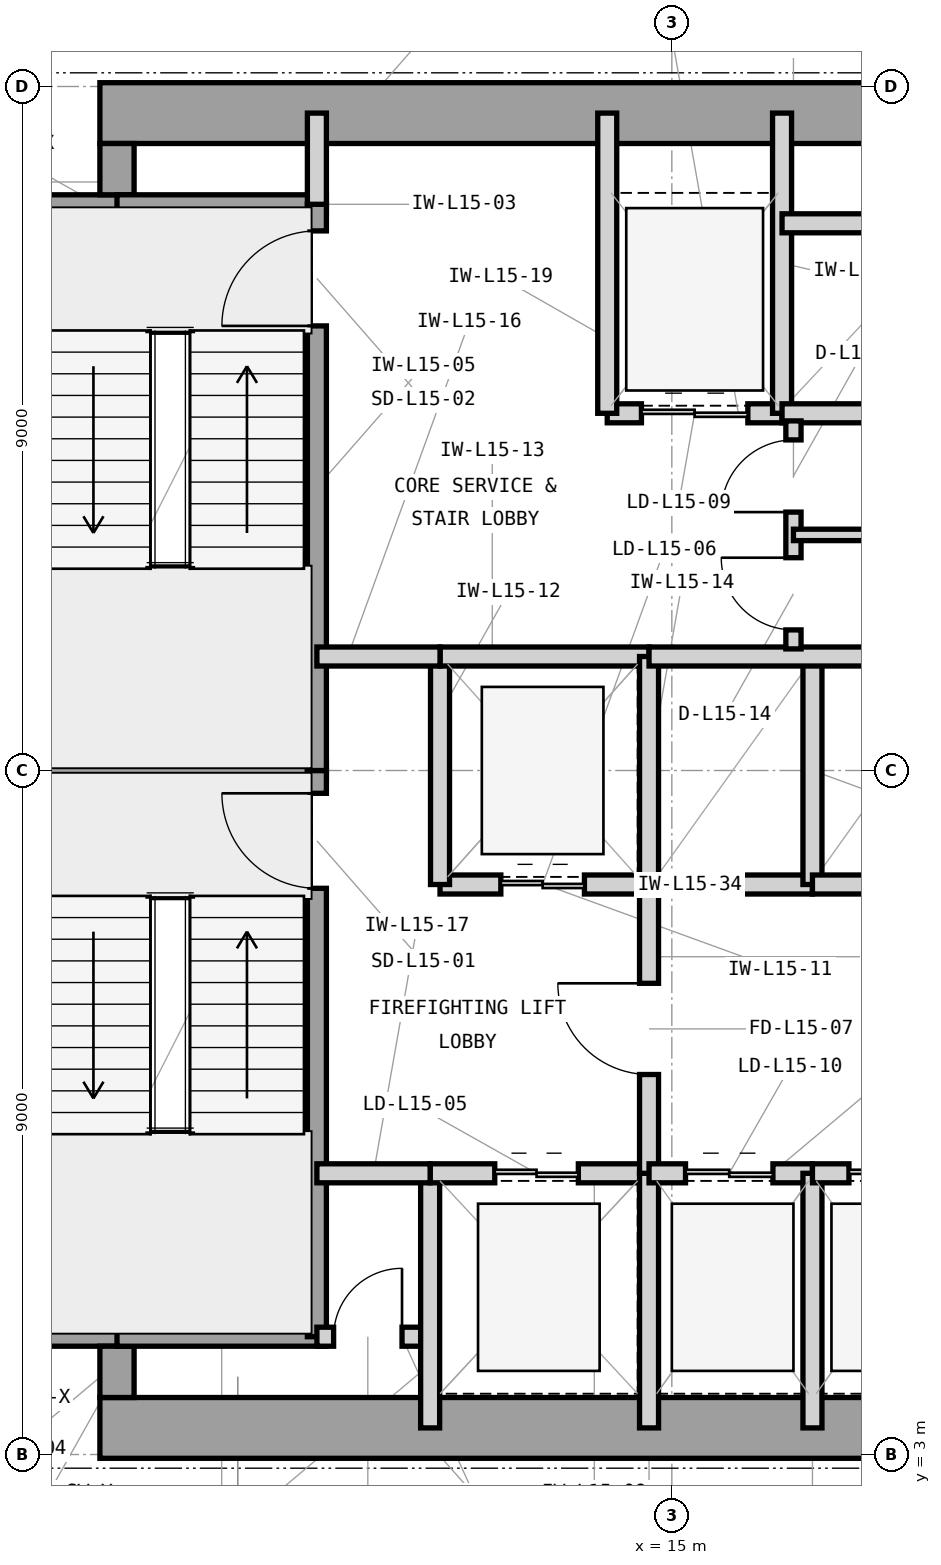
"""IFC4 building model, lengths in metres.
Left out: names, types, materials, properties, quantities, classifications, styles, units other than length and angle.
Written with IfcOpenShell. Run it as: python <this file> out.ifc"""

import sys

from ifc_helpers import new_model, si_unit, direction, frame, frame_2d, origin, place, context, subcontext, project, spatial, rectangle, extrude, element, fill, save


model = new_model("IFC4")
c1 = context("Model", 3, precision=1e-05, world=origin(), true_north=direction((0.0, 1.0)))
c2 = subcontext(c1, "Body", "Model", "MODEL_VIEW")
j1 = project(units=[si_unit("LENGTHUNIT", "METRE"), si_unit("PLANEANGLEUNIT", "RADIAN")], contexts=[c1])
p1 = place(None, origin())
s1 = spatial("IfcSite", under=j1, at=p1, CompositionType="ELEMENT")
p2 = place(p1, origin())
s2 = spatial("IfcBuilding", under=s1, at=p2, CompositionType="ELEMENT")
p3 = place(p2, frame((0.0, 0.0, 67.8)))
s3 = spatial("IfcBuildingStorey", under=s2, at=p3, CompositionType="ELEMENT", Elevation=67.8)
p4 = place(p3, frame((7.475, 3.35, 0.0), z_axis=(0.0, 0.0, 1.0), x_axis=(1.0, 0.0, 0.0)))
e1 = element("IfcWall", 1, at=p4, inside=s3, PredefinedType="SHEAR", context=c2, shape_type="SweptSolid", body=[
    extrude(rectangle(XDim=16.575, YDim=0.8, at=frame_2d((8.288, 0.0))), origin(), (0.0, 0.0, 1.0), 4.2),
])
p5 = place(p3, frame((7.475, 20.65, 0.0), z_axis=(0.0, 0.0, 1.0), x_axis=(1.0, 0.0, 0.0)))
e2 = element("IfcWall", 2, at=p5, inside=s3, PredefinedType="SHEAR", context=c2, shape_type="SweptSolid", body=[
    extrude(rectangle(XDim=12.325, YDim=0.8, at=frame_2d((6.163, 0.0))), origin(), (0.0, 0.0, 1.0), 4.2),
])
p6 = place(p3, frame((6.75, 4.65, 0.0), z_axis=(0.0, 0.0, 1.0), x_axis=(1.0, 0.0, 0.0)))
e3 = element("IfcWall", 3, at=p6, inside=s3, PredefinedType="SHEAR", context=c2, shape_type="SweptSolid", body=[
    extrude(rectangle(XDim=1.175, YDim=0.45, at=frame_2d((0.587, 0.0))), origin(), (0.0, 0.0, 1.0), 4.2),
])
p7 = place(p3, frame((7.7, 3.75, 0.0), z_axis=(0.0, 0.0, 1.0), x_axis=(0.0, 1.0, 0.0)))
e4 = element("IfcWall", 4, at=p7, inside=s3, PredefinedType="SHEAR", context=c2, shape_type="SweptSolid", body=[
    extrude(rectangle(XDim=0.675, YDim=0.45, at=frame_2d((0.337, 0.0))), origin(), (0.0, 0.0, 1.0), 4.2),
])
p8 = place(p3, frame((6.75, 19.35, 0.0), z_axis=(0.0, 0.0, 1.0), x_axis=(1.0, 0.0, 0.0)))
e5 = element("IfcWall", 5, at=p8, inside=s3, PredefinedType="SHEAR", context=c2, shape_type="SweptSolid", body=[
    extrude(rectangle(XDim=1.175, YDim=0.45, at=frame_2d((0.587, 0.0))), origin(), (0.0, 0.0, 1.0), 4.2),
])
p9 = place(p3, frame((7.7, 19.575, 0.0), z_axis=(0.0, 0.0, 1.0), x_axis=(0.0, 1.0, 0.0)))
e6 = element("IfcWall", 6, at=p9, inside=s3, PredefinedType="SHEAR", context=c2, shape_type="SweptSolid", body=[
    extrude(rectangle(XDim=0.675, YDim=0.45, at=frame_2d((0.337, 0.0))), origin(), (0.0, 0.0, 1.0), 4.2),
])
p10 = place(p3, frame((6.35, 12.0, 0.0), z_axis=(0.0, 0.0, 1.0), x_axis=(1.0, 0.0, 0.0)))
e7 = element("IfcWall", 7, at=p10, inside=s3, PredefinedType="SHEAR", context=c2, shape_type="SweptSolid", body=[
    extrude(rectangle(XDim=4.105, YDim=0.25, at=frame_2d((2.052, 0.0))), origin(), (0.0, 0.0, 1.0), 4.2),
])
for number, where, z_axis, x_axis in (
    (8, (7.7, 4.55, 0.0), (0.0, 0.0, 1.0), (1.0, 0.0, 0.0)),
    (9, (7.7, 19.45, 0.0), (0.0, 0.0, 1.0), (1.0, 0.0, 0.0)),
):
    element("IfcWall", number, at=place(p3, frame(where, z_axis=z_axis, x_axis=x_axis)), inside=s3, PredefinedType="SHEAR", context=c2, shape_type="SweptSolid", body=[
        extrude(rectangle(XDim=2.755, YDim=0.25, at=frame_2d((1.377, 0.0))), origin(), (0.0, 0.0, 1.0), 4.2),
    ])
p11 = place(p3, frame((10.33, 4.55, 0.0), z_axis=(0.0, 0.0, 1.0), x_axis=(0.0, 1.0, 0.0)))
e10 = element("IfcWall", 10, at=p11, inside=s3, PredefinedType="SHEAR", context=c2, shape_type="SweptSolid", body=[
    extrude(rectangle(XDim=7.45, YDim=0.25, at=frame_2d((3.725, 0.0))), origin(), (0.0, 0.0, 1.0), 4.2),
])
p12 = place(p11, frame((5.9, 0.0, 0.0)))
e11 = element("IfcOpeningElement", 11, at=p12, cuts=e10, PredefinedType="OPENING", context=c2, shape_type="SweptSolid", body=[
    extrude(rectangle(XDim=1.25, YDim=2.2, at=frame_2d((0.625, 1.1))), frame((0.0, 0.135, 0.0), z_axis=(0.0, -1.0, 0.0), x_axis=(1.0, 0.0, 0.0)), (0.0, 0.0, 1.0), 0.27),
])
p13 = place(p3, frame((10.33, 12.0, 0.0), z_axis=(0.0, 0.0, 1.0), x_axis=(0.0, 1.0, 0.0)))
e12 = element("IfcWall", 12, at=p13, inside=s3, PredefinedType="SHEAR", context=c2, shape_type="SweptSolid", body=[
    extrude(rectangle(XDim=7.45, YDim=0.25, at=frame_2d((3.725, 0.0))), origin(), (0.0, 0.0, 1.0), 4.2),
])
p14 = place(p13, frame((5.85, 0.0, 0.0)))
e13 = element("IfcOpeningElement", 13, at=p14, cuts=e12, PredefinedType="OPENING", context=c2, shape_type="SweptSolid", body=[
    extrude(rectangle(XDim=1.25, YDim=2.2, at=frame_2d((0.625, 1.1))), frame((0.0, 0.135, 0.0), z_axis=(0.0, -1.0, 0.0), x_axis=(1.0, 0.0, 0.0)), (0.0, 0.0, 1.0), 0.27),
])
p15 = place(p3, frame((10.33, 4.55, 0.0), z_axis=(0.0, 0.0, 1.0), x_axis=(1.0, 0.0, 0.0)))
e14 = element("IfcWall", 14, at=p15, inside=s3, PredefinedType="PARTITIONING", context=c2, shape_type="SweptSolid", body=[
    extrude(rectangle(XDim=1.49, YDim=0.25, at=frame_2d((0.745, 0.0))), origin(), (0.0, 0.0, 1.0), 3.97),
])
p16 = place(p15, frame((0.22, 0.0, 0.0)))
e15 = element("IfcOpeningElement", 15, at=p16, cuts=e14, PredefinedType="OPENING", context=c2, shape_type="SweptSolid", body=[
    extrude(rectangle(XDim=0.9, YDim=2.1, at=frame_2d((0.45, 1.05))), frame((0.0, 0.135, 0.0), z_axis=(0.0, -1.0, 0.0), x_axis=(1.0, 0.0, 0.0)), (0.0, 0.0, 1.0), 0.27),
])
p17 = place(p3, frame((11.82, 3.35, 0.0), z_axis=(0.0, 0.0, 1.0), x_axis=(0.0, 1.0, 0.0)))
e16 = element("IfcWall", 16, at=p17, inside=s3, PredefinedType="PARTITIONING", context=c2, shape_type="SweptSolid", body=[
    extrude(rectangle(XDim=3.35, YDim=0.25, at=frame_2d((1.675, 0.0))), origin(), (0.0, 0.0, 1.0), 3.97),
])
p18 = place(p3, frame((10.33, 19.45, 0.0), z_axis=(0.0, 0.0, 1.0), x_axis=(0.0, 1.0, 0.0)))
e17 = element("IfcWall", 17, at=p18, inside=s3, PredefinedType="PARTITIONING", context=c2, shape_type="SweptSolid", body=[
    extrude(rectangle(XDim=1.2, YDim=0.25, at=frame_2d((0.6, 0.0))), origin(), (0.0, 0.0, 1.0), 3.114),
])
p19 = place(p3, frame((11.82, 6.7, 0.0), z_axis=(0.0, 0.0, 1.0), x_axis=(1.0, 0.0, 0.0)))
e18 = element("IfcWall", 18, at=p19, inside=s3, PredefinedType="PARTITIONING", context=c2, shape_type="SweptSolid", body=[
    extrude(rectangle(XDim=2.88, YDim=0.25, at=frame_2d((1.44, 0.0))), origin(), (0.0, 0.0, 1.0), 3.426),
])
p20 = place(p19, frame((0.85, 0.0, 0.0)))
e19 = element("IfcOpeningElement", 19, at=p20, cuts=e18, PredefinedType="OPENING", context=c2, shape_type="SweptSolid", body=[
    extrude(rectangle(XDim=1.1, YDim=2.25, at=frame_2d((0.55, 1.125))), frame((0.0, 0.135, 0.0), z_axis=(0.0, -1.0, 0.0), x_axis=(1.0, 0.0, 0.0)), (0.0, 0.0, 1.0), 0.27),
])
p21 = place(p3, frame((14.7, 3.35, 0.0), z_axis=(0.0, 0.0, 1.0), x_axis=(0.0, 1.0, 0.0)))
e20 = element("IfcWall", 20, at=p21, inside=s3, PredefinedType="PARTITIONING", context=c2, shape_type="SweptSolid", body=[
    extrude(rectangle(XDim=3.35, YDim=0.25, at=frame_2d((1.675, 0.0))), origin(), (0.0, 0.0, 1.0), 3.97),
])
p22 = place(p3, frame((11.95, 10.5, 0.0), z_axis=(0.0, 0.0, 1.0), x_axis=(1.0, 0.0, 0.0)))
e21 = element("IfcWall", 21, at=p22, inside=s3, PredefinedType="PARTITIONING", context=c2, shape_type="SweptSolid", body=[
    extrude(rectangle(XDim=2.75, YDim=0.25, at=frame_2d((1.375, 0.0))), origin(), (0.0, 0.0, 1.0), 3.426),
])
p23 = place(p22, frame((0.8, 0.0, 0.0)))
e22 = element("IfcOpeningElement", 22, at=p23, cuts=e21, PredefinedType="OPENING", context=c2, shape_type="SweptSolid", body=[
    extrude(rectangle(XDim=1.1, YDim=2.25, at=frame_2d((0.55, 1.125))), frame((0.0, 0.135, 0.0), z_axis=(0.0, -1.0, 0.0), x_axis=(1.0, 0.0, 0.0)), (0.0, 0.0, 1.0), 0.27),
])
p24 = place(p3, frame((11.95, 10.5, 0.0), z_axis=(0.0, 0.0, 1.0), x_axis=(0.0, 1.0, 0.0)))
e23 = element("IfcWall", 23, at=p24, inside=s3, PredefinedType="PARTITIONING", context=c2, shape_type="SweptSolid", body=[
    extrude(rectangle(XDim=3.0, YDim=0.25, at=frame_2d((1.5, 0.0))), origin(), (0.0, 0.0, 1.0), 3.97),
])
p25 = place(p3, frame((11.95, 13.5, 0.0), z_axis=(0.0, 0.0, 1.0), x_axis=(1.0, 0.0, 0.0)))
e24 = element("IfcWall", 24, at=p25, inside=s3, PredefinedType="PARTITIONING", context=c2, shape_type="SweptSolid", body=[
    extrude(rectangle(XDim=2.75, YDim=0.25, at=frame_2d((1.375, 0.0))), origin(), (0.0, 0.0, 1.0), 3.426),
])
p26 = place(p3, frame((14.7, 10.5, 0.0), z_axis=(0.0, 0.0, 1.0), x_axis=(0.0, 1.0, 0.0)))
e25 = element("IfcWall", 25, at=p26, inside=s3, PredefinedType="PARTITIONING", context=c2, shape_type="SweptSolid", body=[
    extrude(rectangle(XDim=3.0, YDim=0.25, at=frame_2d((1.5, 0.0))), origin(), (0.0, 0.0, 1.0), 3.97),
])
p27 = place(p3, frame((14.7, 6.7, 0.0), z_axis=(0.0, 0.0, 1.0), x_axis=(0.0, 1.0, 0.0)))
e26 = element("IfcWall", 26, at=p27, inside=s3, PredefinedType="PARTITIONING", context=c2, shape_type="SweptSolid", body=[
    extrude(rectangle(XDim=3.8, YDim=0.25, at=frame_2d((1.9, 0.0))), origin(), (0.0, 0.0, 1.0), 3.97),
])
p28 = place(p27, frame((1.3, 0.0, 0.0)))
e27 = element("IfcOpeningElement", 27, at=p28, cuts=e26, PredefinedType="OPENING", context=c2, shape_type="SweptSolid", body=[
    extrude(rectangle(XDim=1.2, YDim=2.2, at=frame_2d((0.6, 1.1))), frame((0.0, 0.135, 0.0), z_axis=(0.0, -1.0, 0.0), x_axis=(1.0, 0.0, 0.0)), (0.0, 0.0, 1.0), 0.27),
])
p29 = place(p3, frame((10.33, 13.5, 0.0), z_axis=(0.0, 0.0, 1.0), x_axis=(1.0, 0.0, 0.0)))
e28 = element("IfcWall", 28, at=p29, inside=s3, PredefinedType="PARTITIONING", context=c2, shape_type="SweptSolid", body=[
    extrude(rectangle(XDim=1.62, YDim=0.25, at=frame_2d((0.81, 0.0))), origin(), (0.0, 0.0, 1.0), 3.426),
])
p30 = place(p3, frame((10.33, 6.7, 0.0), z_axis=(0.0, 0.0, 1.0), x_axis=(1.0, 0.0, 0.0)))
e29 = element("IfcWall", 29, at=p30, inside=s3, PredefinedType="PARTITIONING", context=c2, shape_type="SweptSolid", body=[
    extrude(rectangle(XDim=1.49, YDim=0.25, at=frame_2d((0.745, 0.0))), origin(), (0.0, 0.0, 1.0), 3.426),
])
p31 = place(p3, frame((14.15, 16.7, 0.0), z_axis=(0.0, 0.0, 1.0), x_axis=(1.0, 0.0, 0.0)))
e30 = element("IfcWall", 30, at=p31, inside=s3, PredefinedType="PARTITIONING", context=c2, shape_type="SweptSolid", body=[
    extrude(rectangle(XDim=2.3, YDim=0.25, at=frame_2d((1.15, 0.0))), origin(), (0.0, 0.0, 1.0), 3.426),
])
p32 = place(p31, frame((0.45, 0.0, 0.0)))
e31 = element("IfcOpeningElement", 31, at=p32, cuts=e30, PredefinedType="OPENING", context=c2, shape_type="SweptSolid", body=[
    extrude(rectangle(XDim=1.4, YDim=2.35, at=frame_2d((0.7, 1.175))), frame((0.0, 0.135, 0.0), z_axis=(0.0, -1.0, 0.0), x_axis=(1.0, 0.0, 0.0)), (0.0, 0.0, 1.0), 0.27),
])
for number, where, z_axis, x_axis in (
    (32, (14.15, 16.7, 0.0), (0.0, 0.0, 1.0), (0.0, 1.0, 0.0)),
    (33, (16.45, 16.7, 0.0), (0.0, 0.0, 1.0), (0.0, 1.0, 0.0)),
):
    element("IfcWall", number, at=place(p3, frame(where, z_axis=z_axis, x_axis=x_axis)), inside=s3, PredefinedType="PARTITIONING", context=c2, shape_type="SweptSolid", body=[
        extrude(rectangle(XDim=3.95, YDim=0.25, at=frame_2d((1.975, 0.0))), origin(), (0.0, 0.0, 1.0), 3.97),
    ])
p33 = place(p3, frame((16.45, 16.7, 0.0), z_axis=(0.0, 0.0, 1.0), x_axis=(1.0, 0.0, 0.0)))
e34 = element("IfcWall", 34, at=p33, inside=s3, PredefinedType="PARTITIONING", context=c2, shape_type="SweptSolid", body=[
    extrude(rectangle(XDim=2.3, YDim=0.25, at=frame_2d((1.15, 0.0))), origin(), (0.0, 0.0, 1.0), 3.426),
])
p34 = place(p3, frame((16.45, 19.2, 0.0), z_axis=(0.0, 0.0, 1.0), x_axis=(1.0, 0.0, 0.0)))
e35 = element("IfcWall", 35, at=p34, inside=s3, PredefinedType="PARTITIONING", context=c2, shape_type="SweptSolid", body=[
    extrude(rectangle(XDim=7.2, YDim=0.25, at=frame_2d((3.6, 0.0))), origin(), (0.0, 0.0, 1.0), 3.97),
])
p35 = place(p3, frame((14.7, 6.7, 0.0), z_axis=(0.0, 0.0, 1.0), x_axis=(1.0, 0.0, 0.0)))
e36 = element("IfcWall", 36, at=p35, inside=s3, PredefinedType="PARTITIONING", context=c2, shape_type="SweptSolid", body=[
    extrude(rectangle(XDim=2.15, YDim=0.25, at=frame_2d((1.075, 0.0))), origin(), (0.0, 0.0, 1.0), 3.426),
])
p36 = place(p35, frame((0.48, 0.0, 0.0)))
e37 = element("IfcOpeningElement", 37, at=p36, cuts=e36, PredefinedType="OPENING", context=c2, shape_type="SweptSolid", body=[
    extrude(rectangle(XDim=1.15, YDim=2.25, at=frame_2d((0.575, 1.125))), frame((0.0, 0.135, 0.0), z_axis=(0.0, -1.0, 0.0), x_axis=(1.0, 0.0, 0.0)), (0.0, 0.0, 1.0), 0.27),
])
p37 = place(p3, frame((16.85, 3.35, 0.0), z_axis=(0.0, 0.0, 1.0), x_axis=(0.0, 1.0, 0.0)))
e38 = element("IfcWall", 38, at=p37, inside=s3, PredefinedType="PARTITIONING", context=c2, shape_type="SweptSolid", body=[
    extrude(rectangle(XDim=3.35, YDim=0.25, at=frame_2d((1.675, 0.0))), origin(), (0.0, 0.0, 1.0), 3.97),
])
p38 = place(p3, frame((16.85, 6.7, 0.0), z_axis=(0.0, 0.0, 1.0), x_axis=(1.0, 0.0, 0.0)))
e39 = element("IfcWall", 39, at=p38, inside=s3, PredefinedType="PARTITIONING", context=c2, shape_type="SweptSolid", body=[
    extrude(rectangle(XDim=2.1, YDim=0.25, at=frame_2d((1.05, 0.0))), origin(), (0.0, 0.0, 1.0), 3.426),
])
p39 = place(p38, frame((0.48, 0.0, 0.0)))
e40 = element("IfcOpeningElement", 40, at=p39, cuts=e39, PredefinedType="OPENING", context=c2, shape_type="SweptSolid", body=[
    extrude(rectangle(XDim=1.15, YDim=2.25, at=frame_2d((0.575, 1.125))), frame((0.0, 0.135, 0.0), z_axis=(0.0, -1.0, 0.0), x_axis=(1.0, 0.0, 0.0)), (0.0, 0.0, 1.0), 0.27),
])
p40 = place(p3, frame((14.7, 10.5, 0.0), z_axis=(0.0, 0.0, 1.0), x_axis=(1.0, 0.0, 0.0)))
e41 = element("IfcWall", 41, at=p40, inside=s3, PredefinedType="PARTITIONING", context=c2, shape_type="SweptSolid", body=[
    extrude(rectangle(XDim=2.15, YDim=0.25, at=frame_2d((1.075, 0.0))), origin(), (0.0, 0.0, 1.0), 3.426),
])
p41 = place(p3, frame((16.85, 10.5, 0.0), z_axis=(0.0, 0.0, 1.0), x_axis=(0.0, 1.0, 0.0)))
e42 = element("IfcWall", 42, at=p41, inside=s3, PredefinedType="PARTITIONING", context=c2, shape_type="SweptSolid", body=[
    extrude(rectangle(XDim=3.0, YDim=0.25, at=frame_2d((1.5, 0.0))), origin(), (0.0, 0.0, 1.0), 3.97),
])
p42 = place(p3, frame((16.85, 10.5, 0.0), z_axis=(0.0, 0.0, 1.0), x_axis=(1.0, 0.0, 0.0)))
e43 = element("IfcWall", 43, at=p42, inside=s3, PredefinedType="PARTITIONING", context=c2, shape_type="SweptSolid", body=[
    extrude(rectangle(XDim=2.1, YDim=0.25, at=frame_2d((1.05, 0.0))), origin(), (0.0, 0.0, 1.0), 3.426),
])
p43 = place(p3, frame((14.7, 13.5, 0.0), z_axis=(0.0, 0.0, 1.0), x_axis=(1.0, 0.0, 0.0)))
e44 = element("IfcWall", 44, at=p43, inside=s3, PredefinedType="PARTITIONING", context=c2, shape_type="SweptSolid", body=[
    extrude(rectangle(XDim=8.95, YDim=0.25, at=frame_2d((4.475, 0.0))), origin(), (0.0, 0.0, 1.0), 3.426),
])
p44 = place(p3, frame((16.6, 13.6, 0.0), z_axis=(0.0, 0.0, 1.0), x_axis=(0.0, 1.0, 0.0)))
e45 = element("IfcWall", 45, at=p44, inside=s3, PredefinedType="PARTITIONING", context=c2, shape_type="SweptSolid", body=[
    extrude(rectangle(XDim=3.0, YDim=0.2, at=frame_2d((1.5, 0.0))), origin(), (0.0, 0.0, 1.0), 3.97),
])
p45 = place(p44, frame((0.25, 0.0, 0.0)))
e46 = element("IfcOpeningElement", 46, at=p45, cuts=e45, PredefinedType="OPENING", context=c2, shape_type="SweptSolid", body=[
    extrude(rectangle(XDim=0.95, YDim=2.1, at=frame_2d((0.475, 1.05))), frame((0.0, 0.11, 0.0), z_axis=(0.0, -1.0, 0.0), x_axis=(1.0, 0.0, 0.0)), (0.0, 0.0, 1.0), 0.22),
])
p46 = place(p44, frame((1.8, 0.0, 0.0)))
e47 = element("IfcOpeningElement", 47, at=p46, cuts=e45, PredefinedType="OPENING", context=c2, shape_type="SweptSolid", body=[
    extrude(rectangle(XDim=0.95, YDim=2.1, at=frame_2d((0.475, 1.05))), frame((0.0, 0.11, 0.0), z_axis=(0.0, -1.0, 0.0), x_axis=(1.0, 0.0, 0.0)), (0.0, 0.0, 1.0), 0.22),
])
p47 = place(p3, frame((16.6, 15.1, 0.0), z_axis=(0.0, 0.0, 1.0), x_axis=(1.0, 0.0, 0.0)))
e48 = element("IfcWall", 48, at=p47, inside=s3, PredefinedType="PARTITIONING", context=c2, shape_type="SweptSolid", body=[
    extrude(rectangle(XDim=3.95, YDim=0.15, at=frame_2d((1.975, 0.0))), origin(), (0.0, 0.0, 1.0), 3.97),
])
p48 = place(p12, origin())
e49 = element("IfcDoor", 49, at=p48, inside=s3, OperationType="SINGLE_SWING_RIGHT", PredefinedType="DOOR", context=c2, shape_type="SweptSolid", body=[
    extrude(rectangle(XDim=1.25, YDim=2.2, at=frame_2d((0.625, 1.1))), frame((0.0, 0.025, 0.0), z_axis=(0.0, -1.0, 0.0), x_axis=(1.0, 0.0, 0.0)), (0.0, 0.0, 1.0), 0.05),
])
fill(e11, e49)
p49 = place(p14, origin())
e50 = element("IfcDoor", 50, at=p49, inside=s3, OperationType="SINGLE_SWING_LEFT", PredefinedType="DOOR", context=c2, shape_type="SweptSolid", body=[
    extrude(rectangle(XDim=1.25, YDim=2.2, at=frame_2d((0.625, 1.1))), frame((0.0, 0.025, 0.0), z_axis=(0.0, -1.0, 0.0), x_axis=(1.0, 0.0, 0.0)), (0.0, 0.0, 1.0), 0.05),
])
fill(e13, e50)
p50 = place(p16, origin())
e51 = element("IfcDoor", 51, at=p50, inside=s3, OperationType="SINGLE_SWING_RIGHT", PredefinedType="TRAPDOOR", context=c2, shape_type="SweptSolid", body=[
    extrude(rectangle(XDim=0.9, YDim=2.1, at=frame_2d((0.45, 1.05))), frame((0.0, 0.025, 0.0), z_axis=(0.0, -1.0, 0.0), x_axis=(1.0, 0.0, 0.0)), (0.0, 0.0, 1.0), 0.05),
])
fill(e15, e51)
p51 = place(p20, origin())
e52 = element("IfcDoor", 52, at=p51, inside=s3, OperationType="DOUBLE_DOOR_SLIDING", PredefinedType="DOOR", context=c2, shape_type="SweptSolid", body=[
    extrude(rectangle(XDim=1.1, YDim=2.25, at=frame_2d((0.55, 1.125))), frame((0.0, 0.025, 0.0), z_axis=(0.0, -1.0, 0.0), x_axis=(1.0, 0.0, 0.0)), (0.0, 0.0, 1.0), 0.05),
])
fill(e19, e52)
p52 = place(p23, origin())
e53 = element("IfcDoor", 53, at=p52, inside=s3, OperationType="DOUBLE_DOOR_SLIDING", PredefinedType="DOOR", context=c2, shape_type="SweptSolid", body=[
    extrude(rectangle(XDim=1.1, YDim=2.25, at=frame_2d((0.55, 1.125))), frame((0.0, 0.025, 0.0), z_axis=(0.0, -1.0, 0.0), x_axis=(1.0, 0.0, 0.0)), (0.0, 0.0, 1.0), 0.05),
])
fill(e22, e53)
p53 = place(p28, origin())
e54 = element("IfcDoor", 54, at=p53, inside=s3, OperationType="SINGLE_SWING_RIGHT", PredefinedType="DOOR", context=c2, shape_type="SweptSolid", body=[
    extrude(rectangle(XDim=1.2, YDim=2.2, at=frame_2d((0.6, 1.1))), frame((0.0, 0.025, 0.0), z_axis=(0.0, -1.0, 0.0), x_axis=(1.0, 0.0, 0.0)), (0.0, 0.0, 1.0), 0.05),
])
fill(e27, e54)
p54 = place(p32, origin())
e55 = element("IfcDoor", 55, at=p54, inside=s3, OperationType="DOUBLE_DOOR_SLIDING", PredefinedType="DOOR", context=c2, shape_type="SweptSolid", body=[
    extrude(rectangle(XDim=1.4, YDim=2.35, at=frame_2d((0.7, 1.175))), frame((0.0, 0.025, 0.0), z_axis=(0.0, -1.0, 0.0), x_axis=(1.0, 0.0, 0.0)), (0.0, 0.0, 1.0), 0.05),
])
fill(e31, e55)
p55 = place(p36, origin())
e56 = element("IfcDoor", 56, at=p55, inside=s3, OperationType="DOUBLE_DOOR_SLIDING", PredefinedType="DOOR", context=c2, shape_type="SweptSolid", body=[
    extrude(rectangle(XDim=1.15, YDim=2.25, at=frame_2d((0.575, 1.125))), frame((0.0, 0.025, 0.0), z_axis=(0.0, -1.0, 0.0), x_axis=(1.0, 0.0, 0.0)), (0.0, 0.0, 1.0), 0.05),
])
fill(e37, e56)
p56 = place(p39, origin())
e57 = element("IfcDoor", 57, at=p56, inside=s3, OperationType="DOUBLE_DOOR_SLIDING", PredefinedType="DOOR", context=c2, shape_type="SweptSolid", body=[
    extrude(rectangle(XDim=1.15, YDim=2.25, at=frame_2d((0.575, 1.125))), frame((0.0, 0.025, 0.0), z_axis=(0.0, -1.0, 0.0), x_axis=(1.0, 0.0, 0.0)), (0.0, 0.0, 1.0), 0.05),
])
fill(e40, e57)
p57 = place(p45, origin())
e58 = element("IfcDoor", 58, at=p57, inside=s3, OperationType="SINGLE_SWING_RIGHT", PredefinedType="DOOR", context=c2, shape_type="SweptSolid", body=[
    extrude(rectangle(XDim=0.95, YDim=2.1, at=frame_2d((0.475, 1.05))), frame((0.0, 0.025, 0.0), z_axis=(0.0, -1.0, 0.0), x_axis=(1.0, 0.0, 0.0)), (0.0, 0.0, 1.0), 0.05),
])
fill(e46, e58)
p58 = place(p46, origin())
e59 = element("IfcDoor", 59, at=p58, inside=s3, OperationType="SINGLE_SWING_LEFT", PredefinedType="DOOR", context=c2, shape_type="SweptSolid", body=[
    extrude(rectangle(XDim=0.95, YDim=2.1, at=frame_2d((0.475, 1.05))), frame((0.0, 0.025, 0.0), z_axis=(0.0, -1.0, 0.0), x_axis=(1.0, 0.0, 0.0)), (0.0, 0.0, 1.0), 0.05),
])
fill(e47, e59)
save(model, sys.argv[1])
